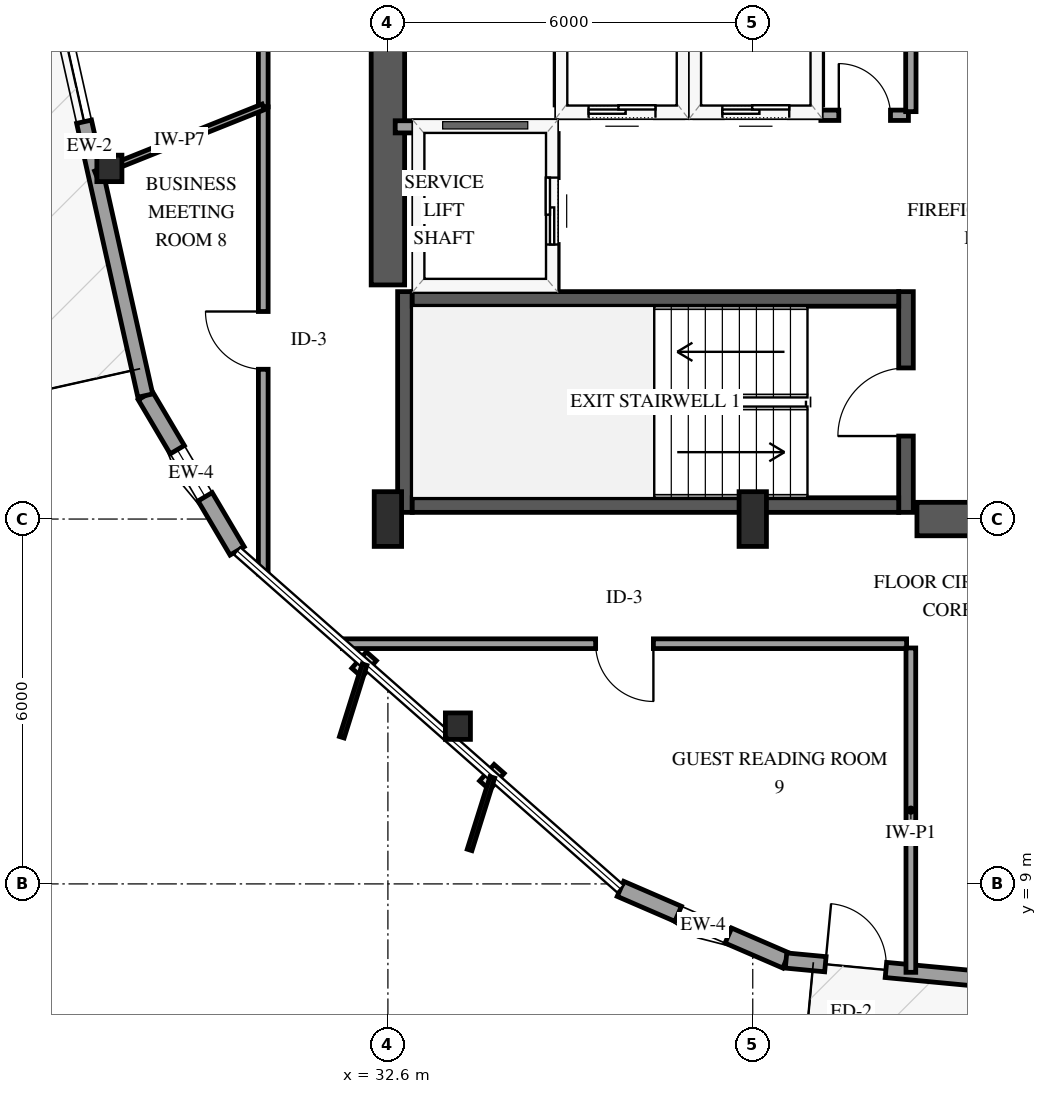
"""IFC4 building model, lengths in metres.
Left out: names, types, materials, properties, quantities, classifications, styles, units other than length and angle.
Written with IfcOpenShell. Run it as: python <this file> out.ifc"""

import sys

from ifc_helpers import new_model, si_unit, direction, frame, frame_2d, origin, origin_2d, place, context, subcontext, project, spatial, rectangle, i_section, extrude, element, fill, save


model = new_model("IFC4")
c1 = context("Model", 3, precision=1e-05, world=origin(), true_north=direction((0.0, 1.0)))
c2 = subcontext(c1, "Body", "Model", "MODEL_VIEW")
j1 = project(units=[si_unit("LENGTHUNIT", "METRE"), si_unit("PLANEANGLEUNIT", "RADIAN")], contexts=[c1])
p1 = place(None, origin())
s1 = spatial("IfcSite", under=j1, at=p1, CompositionType="ELEMENT")
p2 = place(p1, origin())
s2 = spatial("IfcBuilding", under=s1, at=p2, CompositionType="ELEMENT")
p3 = place(p2, frame((0.0, 0.0, 146.2)))
s3 = spatial("IfcBuildingStorey", under=s2, at=p3, CompositionType="ELEMENT", Elevation=146.2)
p4 = place(p3, frame((32.88, 15.11, 0.0), z_axis=(0.0, 0.0, 1.0), x_axis=(0.0, 1.0, 0.0)))
e1 = element("IfcWall", 1, at=p4, inside=s3, PredefinedType="SHEAR", context=c2, shape_type="SweptSolid", body=[
    extrude(rectangle(XDim=3.63, YDim=0.24, at=frame_2d((1.815, 0.0))), origin(), (0.0, 0.0, 1.0), 3.6),
])
p5 = place(p3, frame((41.12, 15.11, 0.0), z_axis=(0.0, 0.0, 1.0), x_axis=(0.0, 1.0, 0.0)))
e2 = element("IfcWall", 2, at=p5, inside=s3, PredefinedType="SHEAR", context=c2, shape_type="SweptSolid", body=[
    extrude(rectangle(XDim=3.63, YDim=0.24, at=frame_2d((1.815, 0.0))), origin(), (0.0, 0.0, 1.0), 3.6),
])
p6 = place(p5, frame((1.255, 0.0, 0.0)))
e3 = element("IfcOpeningElement", 3, at=p6, cuts=e2, PredefinedType="OPENING", context=c2, shape_type="SweptSolid", body=[
    extrude(rectangle(XDim=1.12, YDim=2.15, at=frame_2d((0.56, 1.075))), frame((0.0, 0.13, 0.0), z_axis=(0.0, -1.0, 0.0), x_axis=(1.0, 0.0, 0.0)), (0.0, 0.0, 1.0), 0.26),
])
for number, where, z_axis, x_axis in (
    (4, (33.0, 15.23, 0.0), (0.0, 0.0, 1.0), (1.0, 0.0, 0.0)),
    (5, (33.0, 18.62, 0.0), (0.0, 0.0, 1.0), (1.0, 0.0, 0.0)),
):
    element("IfcWall", number, at=place(p3, frame(where, z_axis=z_axis, x_axis=x_axis)), inside=s3, PredefinedType="SHEAR", context=c2, shape_type="SweptSolid", body=[
        extrude(rectangle(XDim=8.0, YDim=0.24, at=frame_2d((4.0, 0.0))), origin(), (0.0, 0.0, 1.0), 3.6),
    ])
p7 = place(p3, frame((32.6, 18.85, 0.0), z_axis=(0.0, 0.0, 1.0), x_axis=(0.0, 1.0, 0.0)))
e6 = element("IfcWall", 6, at=p7, inside=s3, PredefinedType="SHEAR", context=c2, shape_type="SweptSolid", body=[
    extrude(rectangle(XDim=12.3, YDim=0.55, at=frame_2d((6.15, 0.0))), origin(), (0.0, 0.0, 1.0), 3.6),
])
p8 = place(p3, frame((41.3, 15.0, 0.0), z_axis=(0.0, 0.0, 1.0), x_axis=(1.0, 0.0, 0.0)))
e7 = element("IfcWall", 7, at=p8, inside=s3, PredefinedType="SHEAR", context=c2, shape_type="SweptSolid", body=[
    extrude(rectangle(XDim=2.85, YDim=0.55, at=frame_2d((1.425, 0.0))), origin(), (0.0, 0.0, 1.0), 3.6),
])
for number, where, z_axis, x_axis in (
    (8, (32.6, 15.0, 0.0), (0.0, 0.0, 1.0), (1.0, 0.0, 0.0)),
    (9, (38.6, 15.0, 0.0), (0.0, 0.0, 1.0), (1.0, 0.0, 0.0)),
):
    element("IfcColumn", number, at=place(p3, frame(where, z_axis=z_axis, x_axis=x_axis)), inside=s3, PredefinedType="PILASTER", context=c2, shape_type="SweptSolid", body=[
        extrude(rectangle(XDim=0.45, YDim=0.9, at=origin_2d()), origin(), (0.0, 0.0, 1.0), 3.6),
    ])
for number, where, z_axis, x_axis in (
    (10, (28.02, 20.766, 0.0), (0.0, 0.0, 1.0), (1.0, 0.0, 0.0)),
    (11, (33.751, 11.594, 0.0), (0.0, 0.0, 1.0), (1.0, 0.0, 0.0)),
):
    element("IfcColumn", number, at=place(p3, frame(where, z_axis=z_axis, x_axis=x_axis)), inside=s3, PredefinedType="COLUMN", context=c2, shape_type="SweptSolid", body=[
        extrude(i_section(OverallWidth=0.412, OverallDepth=0.435, WebThickness=0.036, FlangeThickness=0.057, FilletRadius=0.038, at=origin_2d()), origin(), (0.0, 0.0, 1.0), 3.6),
    ])
p9 = place(p3, frame((28.61, 17.03, 0.0), z_axis=(0.0, 0.0, 1.0), x_axis=(0.509075841799, -0.860721666566, 0.0)))
e12 = element("IfcWall", 12, at=p9, inside=s3, PredefinedType="SOLIDWALL", context=c2, shape_type="SweptSolid", body=[
    extrude(rectangle(XDim=2.967, YDim=0.27, at=frame_2d((1.483, 0.0))), origin(), (0.0, 0.0, 1.0), 2.679),
])
p10 = place(p9, frame((1.033, 0.0, 0.75)))
e13 = element("IfcOpeningElement", 13, at=p10, cuts=e12, PredefinedType="OPENING", context=c2, shape_type="SweptSolid", body=[
    extrude(rectangle(XDim=0.9, YDim=1.5, at=frame_2d((0.45, 0.75))), frame((0.0, 0.145, 0.0), z_axis=(0.0, -1.0, 0.0), x_axis=(1.0, 0.0, 0.0)), (0.0, 0.0, 1.0), 0.29),
])
p11 = place(p3, frame((26.776, 25.233, 0.0), z_axis=(0.0, 0.0, 1.0), x_axis=(0.218148242033, -0.975915644151, 0.0)))
e14 = element("IfcWall", 14, at=p11, inside=s3, PredefinedType="SOLIDWALL", context=c2, shape_type="SweptSolid", body=[
    extrude(rectangle(XDim=8.405, YDim=0.25, at=frame_2d((4.202, 0.0))), origin(), (0.0, 0.0, 1.0), 2.679),
])
p12 = place(p11, frame((0.65, 0.0, 0.0)))
e15 = element("IfcOpeningElement", 15, at=p12, cuts=e14, PredefinedType="OPENING", context=c2, shape_type="SweptSolid", body=[
    extrude(rectangle(XDim=1.0, YDim=2.15, at=frame_2d((0.5, 1.075))), frame((0.0, 0.135, 0.0), z_axis=(0.0, -1.0, 0.0), x_axis=(1.0, 0.0, 0.0)), (0.0, 0.0, 1.0), 0.27),
])
p13 = place(p11, frame((2.29, 0.0, 0.72)))
e16 = element("IfcOpeningElement", 16, at=p13, cuts=e14, PredefinedType="OPENING", context=c2, shape_type="SweptSolid", body=[
    extrude(rectangle(XDim=1.5, YDim=1.7, at=frame_2d((0.75, 0.85))), frame((0.0, 0.135, 0.0), z_axis=(0.0, -1.0, 0.0), x_axis=(1.0, 0.0, 0.0)), (0.0, 0.0, 1.0), 0.27),
])
p14 = place(p3, frame((36.425, 8.918, 0.0), z_axis=(0.0, 0.0, 1.0), x_axis=(0.917738684301, -0.397184726969, 0.0)))
e17 = element("IfcWall", 17, at=p14, inside=s3, PredefinedType="SOLIDWALL", context=c2, shape_type="SweptSolid", body=[
    extrude(rectangle(XDim=2.967, YDim=0.27, at=frame_2d((1.483, 0.0))), origin(), (0.0, 0.0, 1.0), 2.679),
])
p15 = place(p14, frame((1.033, 0.0, 0.75)))
e18 = element("IfcOpeningElement", 18, at=p15, cuts=e17, PredefinedType="OPENING", context=c2, shape_type="SweptSolid", body=[
    extrude(rectangle(XDim=0.9, YDim=1.5, at=frame_2d((0.45, 0.75))), frame((0.0, 0.145, 0.0), z_axis=(0.0, -1.0, 0.0), x_axis=(1.0, 0.0, 0.0)), (0.0, 0.0, 1.0), 0.29),
])
p16 = place(p3, frame((39.147, 7.74, 0.0), z_axis=(0.0, 0.0, 1.0), x_axis=(0.995561547902, -0.094112721457, 0.0)))
e19 = element("IfcWall", 19, at=p16, inside=s3, PredefinedType="SOLIDWALL", context=c2, shape_type="SweptSolid", body=[
    extrude(rectangle(XDim=8.405, YDim=0.25, at=frame_2d((4.203, 0.0))), origin(), (0.0, 0.0, 1.0), 2.679),
])
p17 = place(p16, frame((0.65, 0.0, 0.0)))
e20 = element("IfcOpeningElement", 20, at=p17, cuts=e19, PredefinedType="OPENING", context=c2, shape_type="SweptSolid", body=[
    extrude(rectangle(XDim=1.0, YDim=2.15, at=frame_2d((0.5, 1.075))), frame((0.0, 0.135, 0.0), z_axis=(0.0, -1.0, 0.0), x_axis=(1.0, 0.0, 0.0)), (0.0, 0.0, 1.0), 0.27),
])
p18 = place(p16, frame((5.073, 0.0, 0.72)))
e21 = element("IfcOpeningElement", 21, at=p18, cuts=e19, PredefinedType="OPENING", context=c2, shape_type="SweptSolid", body=[
    extrude(rectangle(XDim=1.5, YDim=1.7, at=frame_2d((0.75, 0.85))), frame((0.0, 0.135, 0.0), z_axis=(0.0, -1.0, 0.0), x_axis=(1.0, 0.0, 0.0)), (0.0, 0.0, 1.0), 0.27),
])
p19 = place(p3, frame((35.45, 21.7, 0.0), z_axis=(0.0, 0.0, 1.0), x_axis=(1.0, 0.0, 0.0)))
e22 = element("IfcWall", 22, at=p19, inside=s3, PredefinedType="SOLIDWALL", context=c2, shape_type="SweptSolid", body=[
    extrude(rectangle(XDim=2.0, YDim=0.2, at=frame_2d((1.0, 0.0))), origin(), (0.0, 0.0, 1.0), 3.3),
])
p20 = place(p19, frame((0.45, 0.0, 0.0)))
e23 = element("IfcOpeningElement", 23, at=p20, cuts=e22, PredefinedType="OPENING", context=c2, shape_type="SweptSolid", body=[
    extrude(rectangle(XDim=1.1, YDim=2.15, at=frame_2d((0.55, 1.075))), frame((0.0, 0.11, 0.0), z_axis=(0.0, -1.0, 0.0), x_axis=(1.0, 0.0, 0.0)), (0.0, 0.0, 1.0), 0.22),
])
for number, where, z_axis, x_axis in (
    (24, (35.45, 21.81, 0.0), (0.0, 0.0, 1.0), (0.0, 1.0, 0.0)),
    (25, (37.45, 21.81, 0.0), (0.0, 0.0, 1.0), (0.0, 1.0, 0.0)),
):
    element("IfcWall", number, at=place(p3, frame(where, z_axis=z_axis, x_axis=x_axis)), inside=s3, PredefinedType="SOLIDWALL", context=c2, shape_type="SweptSolid", body=[
        extrude(rectangle(XDim=2.38, YDim=0.2, at=frame_2d((1.19, 0.0))), origin(), (0.0, 0.0, 1.0), 3.3),
    ])
p21 = place(p3, frame((37.65, 21.7, 0.0), z_axis=(0.0, 0.0, 1.0), x_axis=(1.0, 0.0, 0.0)))
e26 = element("IfcWall", 26, at=p21, inside=s3, PredefinedType="SOLIDWALL", context=c2, shape_type="SweptSolid", body=[
    extrude(rectangle(XDim=2.0, YDim=0.2, at=frame_2d((1.0, 0.0))), origin(), (0.0, 0.0, 1.0), 3.3),
])
p22 = place(p21, frame((0.45, 0.0, 0.0)))
e27 = element("IfcOpeningElement", 27, at=p22, cuts=e26, PredefinedType="OPENING", context=c2, shape_type="SweptSolid", body=[
    extrude(rectangle(XDim=1.1, YDim=2.15, at=frame_2d((0.55, 1.075))), frame((0.0, 0.11, 0.0), z_axis=(0.0, -1.0, 0.0), x_axis=(1.0, 0.0, 0.0)), (0.0, 0.0, 1.0), 0.22),
])
p23 = place(p3, frame((39.65, 21.81, 0.0), z_axis=(0.0, 0.0, 1.0), x_axis=(0.0, 1.0, 0.0)))
e28 = element("IfcWall", 28, at=p23, inside=s3, PredefinedType="SOLIDWALL", context=c2, shape_type="SweptSolid", body=[
    extrude(rectangle(XDim=2.38, YDim=0.2, at=frame_2d((1.19, 0.0))), origin(), (0.0, 0.0, 1.0), 3.3),
])
p24 = place(p3, frame((32.72, 21.45, 0.0), z_axis=(0.0, 0.0, 1.0), x_axis=(1.0, 0.0, 0.0)))
e29 = element("IfcWall", 29, at=p24, inside=s3, PredefinedType="SOLIDWALL", context=c2, shape_type="SweptSolid", body=[
    extrude(rectangle(XDim=2.58, YDim=0.2, at=frame_2d((1.29, 0.0))), origin(), (0.0, 0.0, 1.0), 3.3),
])
p25 = place(p3, frame((35.3, 18.79, 0.0), z_axis=(0.0, 0.0, 1.0), x_axis=(0.0, 1.0, 0.0)))
e30 = element("IfcWall", 30, at=p25, inside=s3, PredefinedType="SOLIDWALL", context=c2, shape_type="SweptSolid", body=[
    extrude(rectangle(XDim=2.55, YDim=0.2, at=frame_2d((1.275, 0.0))), origin(), (0.0, 0.0, 1.0), 3.3),
])
p26 = place(p25, frame((0.725, 0.0, 0.0)))
e31 = element("IfcOpeningElement", 31, at=p26, cuts=e30, PredefinedType="OPENING", context=c2, shape_type="SweptSolid", body=[
    extrude(rectangle(XDim=1.1, YDim=2.15, at=frame_2d((0.55, 1.075))), frame((0.0, 0.11, 0.0), z_axis=(0.0, -1.0, 0.0), x_axis=(1.0, 0.0, 0.0)), (0.0, 0.0, 1.0), 0.22),
])
p27 = place(p3, frame((30.55, 21.778, 0.0), z_axis=(0.0, 0.0, 1.0), x_axis=(0.0, 1.0, 0.0)))
e32 = element("IfcWall", 32, at=p27, inside=s3, PredefinedType="PARTITIONING", context=c2, shape_type="SweptSolid", body=[
    extrude(rectangle(XDim=14.368, YDim=0.16, at=frame_2d((7.184, 0.0))), origin(), (0.0, 0.0, 1.0), 3.3),
])
p28 = place(p27, frame((6.709, 0.0, 0.0)))
e33 = element("IfcOpeningElement", 33, at=p28, cuts=e32, PredefinedType="OPENING", context=c2, shape_type="SweptSolid", body=[
    extrude(rectangle(XDim=0.95, YDim=2.15, at=frame_2d((0.475, 1.075))), frame((0.0, 0.09, 0.0), z_axis=(0.0, -1.0, 0.0), x_axis=(1.0, 0.0, 0.0)), (0.0, 0.0, 1.0), 0.18),
])
p29 = place(p3, frame((41.13, 12.95, 0.0), z_axis=(0.0, 0.0, 1.0), x_axis=(-1.0, 0.0, 0.0)))
e34 = element("IfcWall", 34, at=p29, inside=s3, PredefinedType="PARTITIONING", context=c2, shape_type="SweptSolid", body=[
    extrude(rectangle(XDim=9.278, YDim=0.16, at=frame_2d((4.639, 0.0))), origin(), (0.0, 0.0, 1.0), 3.3),
])
p30 = place(p29, frame((4.164, 0.0, 0.0)))
e35 = element("IfcOpeningElement", 35, at=p30, cuts=e34, PredefinedType="OPENING", context=c2, shape_type="SweptSolid", body=[
    extrude(rectangle(XDim=0.95, YDim=2.15, at=frame_2d((0.475, 1.075))), frame((0.0, 0.09, 0.0), z_axis=(0.0, -1.0, 0.0), x_axis=(1.0, 0.0, 0.0)), (0.0, 0.0, 1.0), 0.18),
])
p31 = place(p3, frame((30.55, 14.098, 0.0), z_axis=(0.0, 0.0, 1.0), x_axis=(0.0, 1.0, 0.0)))
e36 = element("IfcWall", 36, at=p31, inside=s3, PredefinedType="PARTITIONING", context=c2, shape_type="SweptSolid", body=[
    extrude(rectangle(XDim=7.68, YDim=0.16, at=frame_2d((3.84, 0.0))), origin(), (0.0, 0.0, 1.0), 3.3),
])
p32 = place(p31, frame((3.365, 0.0, 0.0)))
e37 = element("IfcOpeningElement", 37, at=p32, cuts=e36, PredefinedType="OPENING", context=c2, shape_type="SweptSolid", body=[
    extrude(rectangle(XDim=0.95, YDim=2.15, at=frame_2d((0.475, 1.075))), frame((0.0, 0.09, 0.0), z_axis=(0.0, -1.0, 0.0), x_axis=(1.0, 0.0, 0.0)), (0.0, 0.0, 1.0), 0.18),
])
p33 = place(p3, frame((41.2, 7.546, 0.0), z_axis=(0.0, 0.0, 1.0), x_axis=(0.0, 1.0, 0.0)))
e38 = element("IfcWall", 38, at=p33, inside=s3, PredefinedType="PARTITIONING", context=c2, shape_type="SweptSolid", body=[
    extrude(rectangle(XDim=5.334, YDim=0.16, at=frame_2d((2.667, 0.0))), origin(), (0.0, 0.0, 1.0), 3.3),
])
p34 = place(p3, frame((30.55, 21.778, 0.0), z_axis=(0.0, 0.0, 1.0), x_axis=(-0.928476690885, -0.371390676354, 0.0)))
e39 = element("IfcWall", 39, at=p34, inside=s3, PredefinedType="PARTITIONING", context=c2, shape_type="SweptSolid", body=[
    extrude(rectangle(XDim=2.967, YDim=0.1, at=frame_2d((1.484, 0.0))), origin(), (0.0, 0.0, 1.0), 3.3),
])
p35 = place(p3, frame((39.72, 21.64, 0.0), z_axis=(0.0, 0.0, 1.0), x_axis=(1.0, 0.0, 0.0)))
e40 = element("IfcWall", 40, at=p35, inside=s3, PredefinedType="PARTITIONING", context=c2, shape_type="SweptSolid", body=[
    extrude(rectangle(XDim=1.44, YDim=0.17, at=frame_2d((0.72, 0.0))), origin(), (0.0, 0.0, 1.0), 3.3),
])
p36 = place(p35, frame((0.295, 0.0, 0.0)))
e41 = element("IfcOpeningElement", 41, at=p36, cuts=e40, PredefinedType="OPENING", context=c2, shape_type="SweptSolid", body=[
    extrude(rectangle(XDim=0.85, YDim=2.1, at=frame_2d((0.425, 1.05))), frame((0.0, 0.095, 0.0), z_axis=(0.0, -1.0, 0.0), x_axis=(1.0, 0.0, 0.0)), (0.0, 0.0, 1.0), 0.19),
])
p37 = place(p3, frame((41.2, 21.7, 0.0), z_axis=(0.0, 0.0, 1.0), x_axis=(0.0, 1.0, 0.0)))
e42 = element("IfcWall", 42, at=p37, inside=s3, PredefinedType="PARTITIONING", context=c2, shape_type="SweptSolid", body=[
    extrude(rectangle(XDim=1.12, YDim=0.17, at=frame_2d((0.56, 0.0))), origin(), (0.0, 0.0, 1.0), 3.3),
])
p38 = place(p10, origin())
e43 = element("IfcWindow", 43, at=p38, inside=s3, PartitioningType="SINGLE_PANEL", PredefinedType="WINDOW", context=c2, shape_type="SweptSolid", body=[
    extrude(rectangle(XDim=0.9, YDim=1.5, at=frame_2d((0.45, 0.75))), frame((0.0, 0.03, 0.0), z_axis=(0.0, -1.0, 0.0), x_axis=(1.0, 0.0, 0.0)), (0.0, 0.0, 1.0), 0.06),
])
fill(e13, e43)
p39 = place(p13, origin())
e44 = element("IfcWindow", 44, at=p39, inside=s3, PartitioningType="SINGLE_PANEL", PredefinedType="WINDOW", context=c2, shape_type="SweptSolid", body=[
    extrude(rectangle(XDim=1.5, YDim=1.7, at=frame_2d((0.75, 0.85))), frame((0.0, 0.03, 0.0), z_axis=(0.0, -1.0, 0.0), x_axis=(1.0, 0.0, 0.0)), (0.0, 0.0, 1.0), 0.06),
])
fill(e16, e44)
p40 = place(p15, origin())
e45 = element("IfcWindow", 45, at=p40, inside=s3, PartitioningType="SINGLE_PANEL", PredefinedType="WINDOW", context=c2, shape_type="SweptSolid", body=[
    extrude(rectangle(XDim=0.9, YDim=1.5, at=frame_2d((0.45, 0.75))), frame((0.0, 0.03, 0.0), z_axis=(0.0, -1.0, 0.0), x_axis=(1.0, 0.0, 0.0)), (0.0, 0.0, 1.0), 0.06),
])
fill(e18, e45)
p41 = place(p17, origin())
e46 = element("IfcDoor", 46, at=p41, inside=s3, OperationType="SINGLE_SWING_LEFT", PredefinedType="DOOR", context=c2, shape_type="SweptSolid", body=[
    extrude(rectangle(XDim=1.0, YDim=2.15, at=frame_2d((0.5, 1.075))), frame((0.0, 0.025, 0.0), z_axis=(0.0, -1.0, 0.0), x_axis=(1.0, 0.0, 0.0)), (0.0, 0.0, 1.0), 0.05),
])
fill(e20, e46)
p42 = place(p20, origin())
e47 = element("IfcDoor", 47, at=p42, inside=s3, OperationType="SLIDING_TO_LEFT", PredefinedType="DOOR", context=c2, shape_type="SweptSolid", body=[
    extrude(rectangle(XDim=1.1, YDim=2.15, at=frame_2d((0.55, 1.075))), frame((0.0, 0.025, 0.0), z_axis=(0.0, -1.0, 0.0), x_axis=(1.0, 0.0, 0.0)), (0.0, 0.0, 1.0), 0.05),
])
fill(e23, e47)
p43 = place(p22, origin())
e48 = element("IfcDoor", 48, at=p43, inside=s3, OperationType="SLIDING_TO_LEFT", PredefinedType="DOOR", context=c2, shape_type="SweptSolid", body=[
    extrude(rectangle(XDim=1.1, YDim=2.15, at=frame_2d((0.55, 1.075))), frame((0.0, 0.025, 0.0), z_axis=(0.0, -1.0, 0.0), x_axis=(1.0, 0.0, 0.0)), (0.0, 0.0, 1.0), 0.05),
])
fill(e27, e48)
p44 = place(p26, origin())
e49 = element("IfcDoor", 49, at=p44, inside=s3, OperationType="SLIDING_TO_LEFT", PredefinedType="DOOR", context=c2, shape_type="SweptSolid", body=[
    extrude(rectangle(XDim=1.1, YDim=2.15, at=frame_2d((0.55, 1.075))), frame((0.0, 0.025, 0.0), z_axis=(0.0, -1.0, 0.0), x_axis=(1.0, 0.0, 0.0)), (0.0, 0.0, 1.0), 0.05),
])
fill(e31, e49)
p45 = place(p6, origin())
e50 = element("IfcDoor", 50, at=p45, inside=s3, OperationType="SINGLE_SWING_LEFT", PredefinedType="DOOR", context=c2, shape_type="SweptSolid", body=[
    extrude(rectangle(XDim=1.12, YDim=2.15, at=frame_2d((0.56, 1.075))), frame((0.0, 0.025, 0.0), z_axis=(0.0, -1.0, 0.0), x_axis=(1.0, 0.0, 0.0)), (0.0, 0.0, 1.0), 0.05),
])
fill(e3, e50)
p46 = place(p30, origin())
e51 = element("IfcDoor", 51, at=p46, inside=s3, OperationType="SINGLE_SWING_LEFT", PredefinedType="DOOR", context=c2, shape_type="SweptSolid", body=[
    extrude(rectangle(XDim=0.95, YDim=2.15, at=frame_2d((0.475, 1.075))), frame((0.0, 0.025, 0.0), z_axis=(0.0, -1.0, 0.0), x_axis=(1.0, 0.0, 0.0)), (0.0, 0.0, 1.0), 0.05),
])
fill(e35, e51)
p47 = place(p32, origin())
e52 = element("IfcDoor", 52, at=p47, inside=s3, OperationType="SINGLE_SWING_RIGHT", PredefinedType="DOOR", context=c2, shape_type="SweptSolid", body=[
    extrude(rectangle(XDim=0.95, YDim=2.15, at=frame_2d((0.475, 1.075))), frame((0.0, 0.025, 0.0), z_axis=(0.0, -1.0, 0.0), x_axis=(1.0, 0.0, 0.0)), (0.0, 0.0, 1.0), 0.05),
])
fill(e37, e52)
p48 = place(p36, origin())
e53 = element("IfcDoor", 53, at=p48, inside=s3, OperationType="SINGLE_SWING_LEFT", PredefinedType="DOOR", context=c2, shape_type="SweptSolid", body=[
    extrude(rectangle(XDim=0.85, YDim=2.1, at=frame_2d((0.425, 1.05))), frame((0.0, 0.025, 0.0), z_axis=(0.0, -1.0, 0.0), x_axis=(1.0, 0.0, 0.0)), (0.0, 0.0, 1.0), 0.05),
])
fill(e41, e53)
save(model, sys.argv[1])
